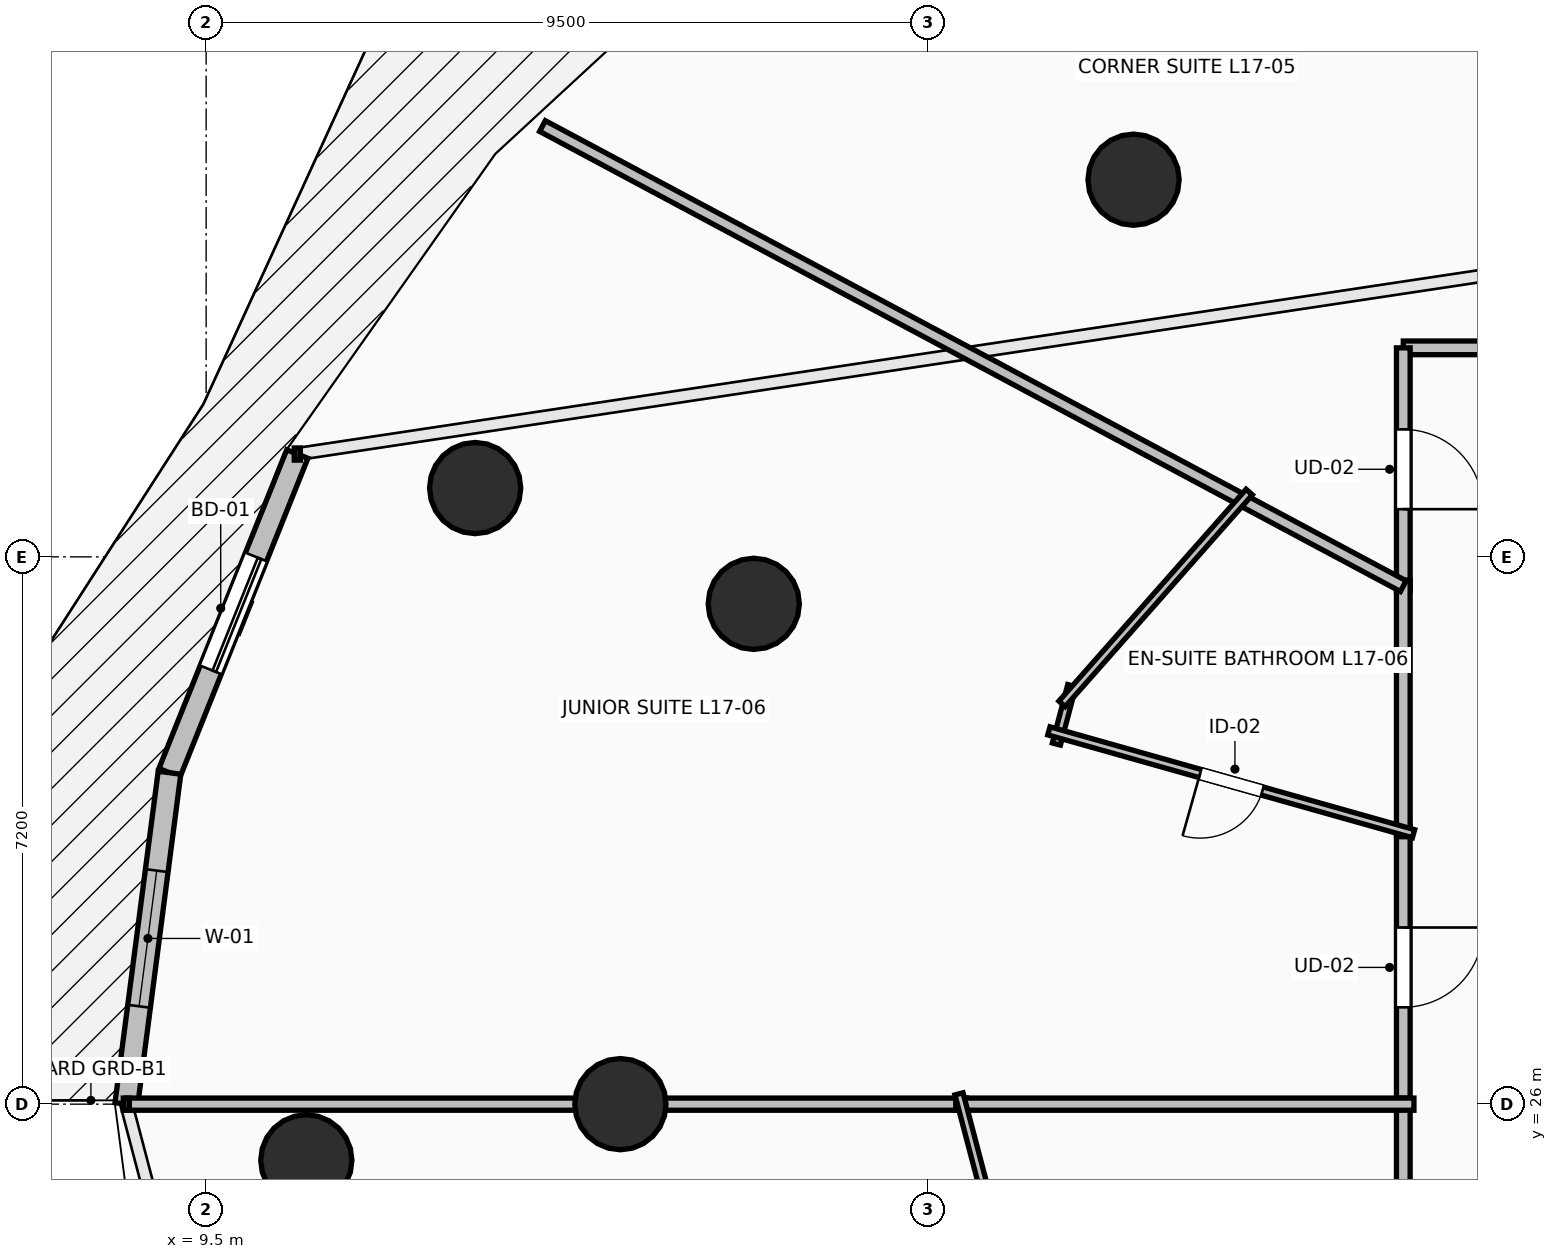
"""IFC4 building model, lengths in metres.
Left out: names, types, materials, properties, quantities, classifications, styles, units other than length and angle.
Written with IfcOpenShell. Run it as: python <this file> out.ifc"""

import sys

from ifc_helpers import new_model, si_unit, direction, frame, frame_2d, origin, origin_2d, place, context, subcontext, project, spatial, rectangle, circle, extrude, element, fill, save


model = new_model("IFC4")
c1 = context("Model", 3, precision=1e-05, world=origin(), true_north=direction((0.0, 1.0)))
c2 = subcontext(c1, "Body", "Model", "MODEL_VIEW")
j1 = project(units=[si_unit("LENGTHUNIT", "METRE"), si_unit("PLANEANGLEUNIT", "RADIAN")], contexts=[c1])
p1 = place(None, origin())
s1 = spatial("IfcSite", under=j1, at=p1, CompositionType="ELEMENT")
p2 = place(p1, origin())
s2 = spatial("IfcBuilding", under=s1, at=p2, CompositionType="ELEMENT")
p3 = place(p2, frame((0.0, 0.0, 66.0)))
s3 = spatial("IfcBuildingStorey", under=s2, at=p3, CompositionType="ELEMENT", Elevation=66.0)
for number, where, z_axis, x_axis in (
    (1, (21.701, 38.162, 0.0), (0.0, 0.0, 1.0), (-0.707, 0.707, 0.0)),
    (2, (16.705, 32.582, 0.0), (0.0, 0.0, 1.0), (-0.924, 0.383, 0.0)),
    (3, (14.95, 26.0, 0.0), (0.0, 0.0, 1.0), (-1.0, 0.0, 0.0)),
    (4, (13.039, 34.105, 0.0), (0.0, 0.0, 1.0), (-0.924, 0.383, 0.0)),
    (5, (10.818, 25.261, 0.0), (0.0, 0.0, 1.0), (-1.0, 0.0, 0.0)),
):
    element("IfcColumn", number, at=place(p3, frame(where, z_axis=z_axis, x_axis=x_axis)), inside=s3, PredefinedType="COLUMN", context=c2, shape_type="SweptSolid", body=[
        extrude(circle(Radius=0.6, at=origin_2d()), origin(), (0.0, 0.0, 1.0), 3.5),
    ])
p4 = place(p3, frame((10.699, 34.553, 0.0), z_axis=(0.0, 0.0, 1.0), x_axis=(-0.372266423315, -0.928125912833, 0.0)))
e6 = element("IfcWall", 6, at=p4, inside=s3, PredefinedType="STANDARD", context=c2, shape_type="SweptSolid", body=[
    extrude(rectangle(XDim=4.517, YDim=0.3, at=frame_2d((2.259, 0.0))), origin(), (0.0, 0.0, 1.0), 3.15),
])
p5 = place(p4, frame((1.459, 0.0, 0.0)))
e7 = element("IfcOpeningElement", 7, at=p5, cuts=e6, PredefinedType="OPENING", context=c2, shape_type="SweptSolid", body=[
    extrude(rectangle(XDim=1.6, YDim=2.3, at=frame_2d((0.8, 1.15))), frame((0.0, 0.165, 0.0), z_axis=(0.0, -1.0, 0.0), x_axis=(1.0, 0.0, 0.0)), (0.0, 0.0, 1.0), 0.33),
])
p6 = place(p3, frame((9.018, 30.36, 0.0), z_axis=(0.0, 0.0, 1.0), x_axis=(-0.129144544413, -0.99162577954, 0.0)))
e8 = element("IfcWall", 8, at=p6, inside=s3, PredefinedType="STANDARD", context=c2, shape_type="SweptSolid", body=[
    extrude(rectangle(XDim=4.397, YDim=0.3, at=frame_2d((2.199, 0.0))), origin(), (0.0, 0.0, 1.0), 3.15),
])
p7 = place(p6, frame((1.299, 0.0, 0.85)))
e9 = element("IfcOpeningElement", 9, at=p7, cuts=e8, PredefinedType="OPENING", context=c2, shape_type="SweptSolid", body=[
    extrude(rectangle(XDim=1.8, YDim=2.1, at=frame_2d((0.9, 1.05))), frame((0.0, 0.165, 0.0), z_axis=(0.0, -1.0, 0.0), x_axis=(1.0, 0.0, 0.0)), (0.0, 0.0, 1.0), 0.33),
])
p8 = place(p3, frame((27.711, 35.95, 0.0), z_axis=(0.0, 0.0, 1.0), x_axis=(-1.0, 0.0, 0.0)))
e10 = element("IfcWall", 10, at=p8, inside=s3, PredefinedType="PARTITIONING", context=c2, shape_type="SweptSolid", body=[
    extrude(rectangle(XDim=2.461, YDim=0.18, at=frame_2d((1.23, 0.0))), origin(), (0.0, 0.0, 1.0), 2.342),
])
p9 = place(p3, frame((25.25, 35.95, 0.0), z_axis=(0.0, 0.0, 1.0), x_axis=(0.0, -1.0, 0.0)))
e11 = element("IfcWall", 11, at=p9, inside=s3, PredefinedType="PARTITIONING", context=c2, shape_type="SweptSolid", body=[
    extrude(rectangle(XDim=3.195, YDim=0.18, at=frame_2d((1.598, 0.0))), origin(), (0.0, 0.0, 1.0), 2.342),
])
p10 = place(p9, frame((1.073, 0.0, 0.0)))
e12 = element("IfcOpeningElement", 12, at=p10, cuts=e11, PredefinedType="OPENING", context=c2, shape_type="SweptSolid", body=[
    extrude(rectangle(XDim=1.05, YDim=2.2, at=frame_2d((0.525, 1.1))), frame((0.0, 0.105, 0.0), z_axis=(0.0, -1.0, 0.0), x_axis=(1.0, 0.0, 0.0)), (0.0, 0.0, 1.0), 0.21),
])
p11 = place(p3, frame((25.25, 29.658, 0.0), z_axis=(0.0, 0.0, 1.0), x_axis=(0.0, -1.0, 0.0)))
e13 = element("IfcWall", 13, at=p11, inside=s3, PredefinedType="PARTITIONING", context=c2, shape_type="SweptSolid", body=[
    extrude(rectangle(XDim=3.718, YDim=0.18, at=frame_2d((1.859, 0.0))), origin(), (0.0, 0.0, 1.0), 2.342),
])
p12 = place(p11, frame((1.334, 0.0, 0.0)))
e14 = element("IfcOpeningElement", 14, at=p12, cuts=e13, PredefinedType="OPENING", context=c2, shape_type="SweptSolid", body=[
    extrude(rectangle(XDim=1.05, YDim=2.2, at=frame_2d((0.525, 1.1))), frame((0.0, 0.105, 0.0), z_axis=(0.0, -1.0, 0.0), x_axis=(1.0, 0.0, 0.0)), (0.0, 0.0, 1.0), 0.21),
])
p13 = place(p3, frame((25.25, 32.895, 0.0), z_axis=(0.0, 0.0, 1.0), x_axis=(0.0, -1.0, 0.0)))
e15 = element("IfcWall", 15, at=p13, inside=s3, PredefinedType="PARTITIONING", context=c2, shape_type="SweptSolid", body=[
    extrude(rectangle(XDim=3.377, YDim=0.18, at=frame_2d((1.688, 0.0))), origin(), (0.0, 0.0, 1.0), 3.15),
])
p14 = place(p3, frame((25.25, 26.08, 0.0), z_axis=(0.0, 0.0, 1.0), x_axis=(0.0, -1.0, 0.0)))
e16 = element("IfcWall", 16, at=p14, inside=s3, PredefinedType="PARTITIONING", context=c2, shape_type="SweptSolid", body=[
    extrude(rectangle(XDim=2.957, YDim=0.18, at=frame_2d((1.479, 0.0))), origin(), (0.0, 0.0, 1.0), 3.15),
])
p15 = place(p3, frame((24.733, 45.856, 0.0), z_axis=(0.0, 0.0, 1.0), x_axis=(0.555564858458, -0.831473203444, 0.0)))
e17 = element("IfcWall", 17, at=p15, inside=s3, PredefinedType="PARTITIONING", context=c2, shape_type="SweptSolid", body=[
    extrude(rectangle(XDim=9.054, YDim=0.16, at=frame_2d((4.527, 0.0))), origin(), (0.0, 0.0, 1.0), 2.342),
])
p16 = place(p3, frame((13.925, 38.868, 0.0), z_axis=(0.0, 0.0, 1.0), x_axis=(0.881932077496, -0.471376506292, 0.0)))
e18 = element("IfcWall", 18, at=p16, inside=s3, PredefinedType="PARTITIONING", context=c2, shape_type="SweptSolid", body=[
    extrude(rectangle(XDim=12.841, YDim=0.16, at=frame_2d((6.42, 0.0))), origin(), (0.0, 0.0, 1.0), 2.534),
])
p17 = place(p3, frame((20.686, 30.738, 0.0), z_axis=(0.0, 0.0, 1.0), x_axis=(0.254583995409, 0.967050665313, 0.0)))
e19 = element("IfcWall", 19, at=p17, inside=s3, PredefinedType="PARTITIONING", context=c2, shape_type="SweptSolid", body=[
    extrude(rectangle(XDim=0.795, YDim=0.11, at=frame_2d((0.397, 0.0))), origin(), (0.0, 0.0, 1.0), 2.342),
])
p18 = place(p3, frame((20.76, 31.266, 0.0), z_axis=(0.0, 0.0, 1.0), x_axis=(0.662136072578, 0.74938362765, 0.0)))
e20 = element("IfcWall", 20, at=p18, inside=s3, PredefinedType="PARTITIONING", context=c2, shape_type="SweptSolid", body=[
    extrude(rectangle(XDim=3.719, YDim=0.11, at=frame_2d((1.859, 0.0))), origin(), (0.0, 0.0, 1.0), 3.15),
])
p19 = place(p3, frame((25.385, 29.558, 0.0), z_axis=(0.0, 0.0, 1.0), x_axis=(-0.962466408657, 0.271400833098, 0.0)))
e21 = element("IfcWall", 21, at=p19, inside=s3, PredefinedType="PARTITIONING", context=c2, shape_type="SweptSolid", body=[
    extrude(rectangle(XDim=4.984, YDim=0.11, at=frame_2d((2.492, 0.0))), origin(), (0.0, 0.0, 1.0), 2.342),
])
p20 = place(p19, frame((2.067, 0.0, 0.0)))
e22 = element("IfcOpeningElement", 22, at=p20, cuts=e21, PredefinedType="OPENING", context=c2, shape_type="SweptSolid", body=[
    extrude(rectangle(XDim=0.85, YDim=2.1, at=frame_2d((0.425, 1.05))), frame((0.0, 0.07, 0.0), z_axis=(0.0, -1.0, 0.0), x_axis=(1.0, 0.0, 0.0)), (0.0, 0.0, 1.0), 0.14),
])
p21 = place(p3, frame((8.451, 26.0, 0.0), z_axis=(0.0, 0.0, 1.0), x_axis=(1.0, 0.0, 0.0)))
e23 = element("IfcWall", 23, at=p21, inside=s3, PredefinedType="PARTITIONING", context=c2, shape_type="SweptSolid", body=[
    extrude(rectangle(XDim=11.051, YDim=0.16, at=frame_2d((5.525, 0.0))), origin(), (0.0, 0.0, 1.0), 2.342),
])
p22 = place(p3, frame((19.362, 26.0, 0.0), z_axis=(0.0, 0.0, 1.0), x_axis=(1.0, 0.0, 0.0)))
e24 = element("IfcWall", 24, at=p22, inside=s3, PredefinedType="PARTITIONING", context=c2, shape_type="SweptSolid", body=[
    extrude(rectangle(XDim=6.028, YDim=0.16, at=frame_2d((3.014, 0.0))), origin(), (0.0, 0.0, 1.0), 2.784),
])
p23 = place(p3, frame((20.489, 22.015, 0.0), z_axis=(0.0, 0.0, 1.0), x_axis=(-0.254448175288, 0.967086410872, 0.0)))
e25 = element("IfcWall", 25, at=p23, inside=s3, PredefinedType="PARTITIONING", context=c2, shape_type="SweptSolid", body=[
    extrude(rectangle(XDim=4.261, YDim=0.11, at=frame_2d((2.13, 0.0))), origin(), (0.0, 0.0, 1.0), 3.15),
])
p24 = place(p5, origin())
e26 = element("IfcDoor", 26, at=p24, inside=s3, OperationType="SLIDING_TO_LEFT", PredefinedType="DOOR", context=c2, shape_type="SweptSolid", body=[
    extrude(rectangle(XDim=1.6, YDim=2.3, at=frame_2d((0.8, 1.15))), frame((0.0, 0.025, 0.0), z_axis=(0.0, -1.0, 0.0), x_axis=(1.0, 0.0, 0.0)), (0.0, 0.0, 1.0), 0.05),
])
fill(e7, e26)
p25 = place(p7, origin())
e27 = element("IfcWindow", 27, at=p25, inside=s3, PartitioningType="SINGLE_PANEL", PredefinedType="WINDOW", context=c2, shape_type="SweptSolid", body=[
    extrude(rectangle(XDim=1.8, YDim=2.1, at=frame_2d((0.9, 1.05))), frame((0.0, 0.03, 0.0), z_axis=(0.0, -1.0, 0.0), x_axis=(1.0, 0.0, 0.0)), (0.0, 0.0, 1.0), 0.06),
])
fill(e9, e27)
p26 = place(p10, origin())
e28 = element("IfcDoor", 28, at=p26, inside=s3, OperationType="SINGLE_SWING_RIGHT", PredefinedType="DOOR", context=c2, shape_type="SweptSolid", body=[
    extrude(rectangle(XDim=1.05, YDim=2.2, at=frame_2d((0.525, 1.1))), frame((0.0, 0.025, 0.0), z_axis=(0.0, -1.0, 0.0), x_axis=(1.0, 0.0, 0.0)), (0.0, 0.0, 1.0), 0.05),
])
fill(e12, e28)
p27 = place(p12, origin())
e29 = element("IfcDoor", 29, at=p27, inside=s3, OperationType="SINGLE_SWING_LEFT", PredefinedType="DOOR", context=c2, shape_type="SweptSolid", body=[
    extrude(rectangle(XDim=1.05, YDim=2.2, at=frame_2d((0.525, 1.1))), frame((0.0, 0.025, 0.0), z_axis=(0.0, -1.0, 0.0), x_axis=(1.0, 0.0, 0.0)), (0.0, 0.0, 1.0), 0.05),
])
fill(e14, e29)
p28 = place(p20, origin())
e30 = element("IfcDoor", 30, at=p28, inside=s3, OperationType="SINGLE_SWING_RIGHT", PredefinedType="DOOR", context=c2, shape_type="SweptSolid", body=[
    extrude(rectangle(XDim=0.85, YDim=2.1, at=frame_2d((0.425, 1.05))), frame((0.0, 0.025, 0.0), z_axis=(0.0, -1.0, 0.0), x_axis=(1.0, 0.0, 0.0)), (0.0, 0.0, 1.0), 0.05),
])
fill(e22, e30)
save(model, sys.argv[1])
